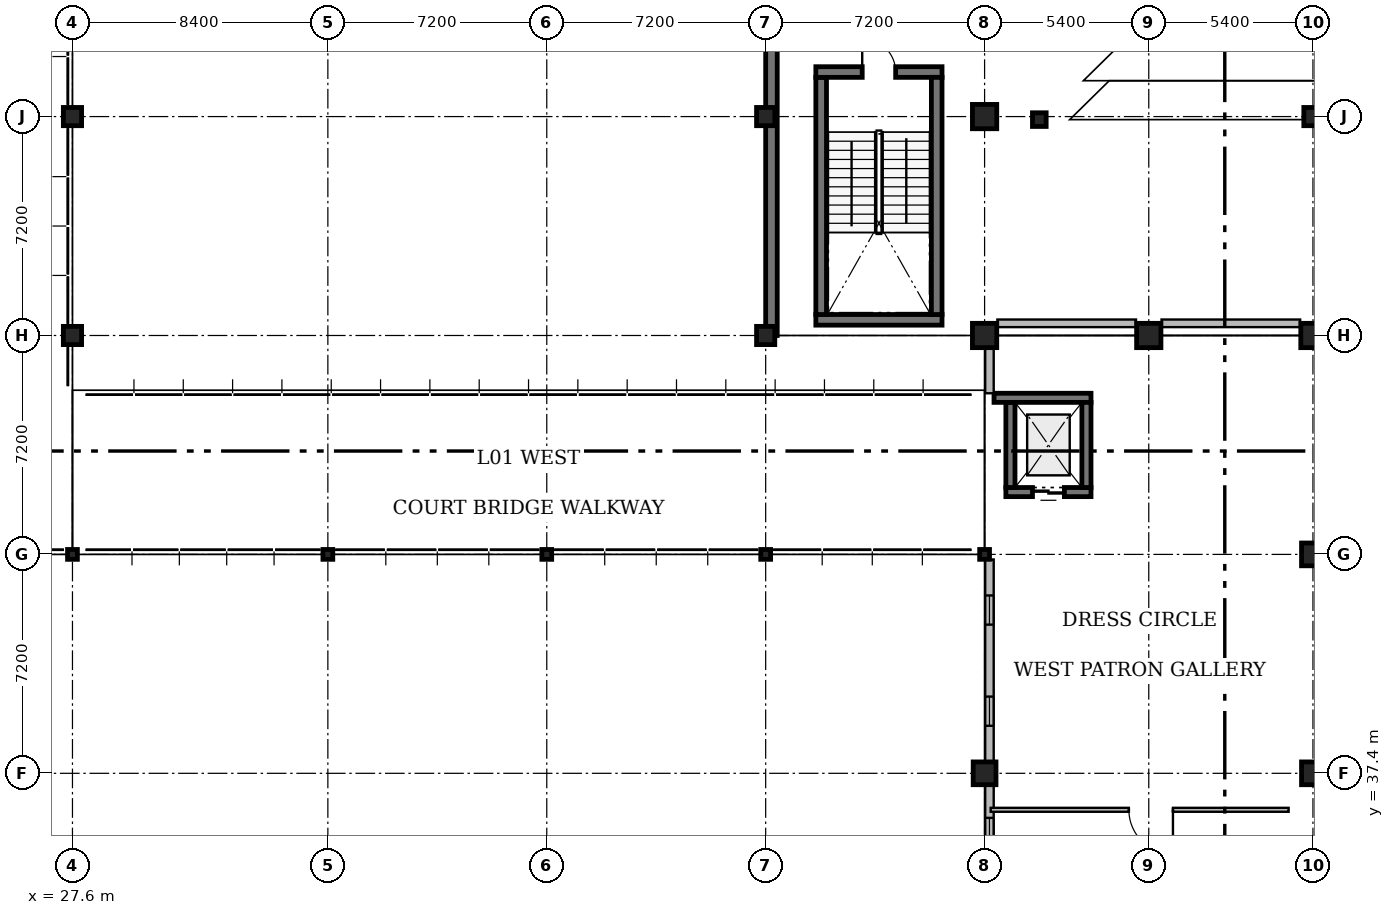
"""IFC4 building model, lengths in metres.
Left out: names, types, materials, properties, quantities, classifications, styles, units other than length and angle.
Written with IfcOpenShell. Run it as: python <this file> out.ifc"""

import sys

from ifc_helpers import new_model, si_unit, direction, frame, frame_2d, origin, origin_2d, place, context, subcontext, project, spatial, rectangle, circle, hollow_circle, extrude, element, fill, save


model = new_model("IFC4")
c1 = context("Model", 3, precision=1e-05, world=origin(), true_north=direction((0.0, 1.0)))
c2 = subcontext(c1, "Body", "Model", "MODEL_VIEW")
j1 = project(units=[si_unit("LENGTHUNIT", "METRE"), si_unit("PLANEANGLEUNIT", "RADIAN")], contexts=[c1])
p1 = place(None, origin())
s1 = spatial("IfcSite", under=j1, at=p1, CompositionType="ELEMENT")
p2 = place(p1, origin())
s2 = spatial("IfcBuilding", under=s1, at=p2, CompositionType="ELEMENT")
p3 = place(p2, frame((0.0, 0.0, 4.8)))
s3 = spatial("IfcBuildingStorey", under=s2, at=p3, CompositionType="ELEMENT", Elevation=4.8)
for number, where, z_axis, x_axis in (
    (1, (68.4, 37.4, 0.0), (0.0, 0.0, 1.0), (1.0, 0.0, 0.0)),
    (2, (68.4, 44.6, 0.0), (0.0, 0.0, 1.0), (1.0, 0.0, 0.0)),
):
    element("IfcColumn", number, at=place(p3, frame(where, z_axis=z_axis, x_axis=x_axis)), inside=s3, PredefinedType="COLUMN", context=c2, shape_type="SweptSolid", body=[
        extrude(circle(Radius=0.375, at=origin_2d()), origin(), (0.0, 0.0, 1.0), 4.2),
    ])
p4 = place(p3, frame((68.4, 51.8, 0.0), z_axis=(0.0, 0.0, 1.0), x_axis=(1.0, 0.0, 0.0)))
e3 = element("IfcColumn", 3, at=p4, inside=s3, PredefinedType="COLUMN", context=c2, shape_type="SweptSolid", body=[
    extrude(rectangle(XDim=0.8, YDim=0.8, at=origin_2d()), origin(), (0.0, 0.0, 1.0), 4.2),
])
p5 = place(p3, frame((68.4, 59.0, 0.0), z_axis=(0.0, 0.0, 1.0), x_axis=(1.0, 0.0, 0.0)))
e4 = element("IfcColumn", 4, at=p5, inside=s3, PredefinedType="COLUMN", context=c2, shape_type="SweptSolid", body=[
    extrude(rectangle(XDim=0.6, YDim=0.6, at=origin_2d()), origin(), (0.0, 0.0, 1.0), 4.2),
])
p6 = place(p3, frame((27.6, 44.6, 0.0), z_axis=(0.0, 0.0, 1.0), x_axis=(1.0, 0.0, 0.0)))
e5 = element("IfcColumn", 5, at=p6, inside=s3, PredefinedType="COLUMN", context=c2, shape_type="SweptSolid", body=[
    extrude(hollow_circle(Radius=0.162, WallThickness=0.012, at=origin_2d()), origin(), (0.0, 0.0, 1.0), 4.2),
])
for number, where, z_axis, x_axis in (
    (6, (27.6, 51.8, 0.0), (0.0, 0.0, 1.0), (1.0, 0.0, 0.0)),
    (7, (27.6, 59.0, 0.0), (0.0, 0.0, 1.0), (1.0, 0.0, 0.0)),
):
    element("IfcColumn", number, at=place(p3, frame(where, z_axis=z_axis, x_axis=x_axis)), inside=s3, PredefinedType="COLUMN", context=c2, shape_type="SweptSolid", body=[
        extrude(rectangle(XDim=0.6, YDim=0.6, at=origin_2d()), origin(), (0.0, 0.0, 1.0), 4.2),
    ])
for number, where, z_axis, x_axis in (
    (8, (36.0, 44.6, 0.0), (0.0, 0.0, 1.0), (1.0, 0.0, 0.0)),
    (9, (43.2, 44.6, 0.0), (0.0, 0.0, 1.0), (1.0, 0.0, 0.0)),
    (10, (50.4, 44.6, 0.0), (0.0, 0.0, 1.0), (1.0, 0.0, 0.0)),
):
    element("IfcColumn", number, at=place(p3, frame(where, z_axis=z_axis, x_axis=x_axis)), inside=s3, PredefinedType="COLUMN", context=c2, shape_type="SweptSolid", body=[
        extrude(hollow_circle(Radius=0.162, WallThickness=0.012, at=origin_2d()), origin(), (0.0, 0.0, 1.0), 4.2),
    ])
for number, where, z_axis, x_axis in (
    (11, (50.4, 51.8, 0.0), (0.0, 0.0, 1.0), (1.0, 0.0, 0.0)),
    (12, (50.4, 59.0, 0.0), (0.0, 0.0, 1.0), (1.0, 0.0, 0.0)),
):
    element("IfcColumn", number, at=place(p3, frame(where, z_axis=z_axis, x_axis=x_axis)), inside=s3, PredefinedType="COLUMN", context=c2, shape_type="SweptSolid", body=[
        extrude(rectangle(XDim=0.6, YDim=0.6, at=origin_2d()), origin(), (0.0, 0.0, 1.0), 4.2),
    ])
p7 = place(p3, frame((57.6, 37.4, 0.0), z_axis=(0.0, 0.0, 1.0), x_axis=(1.0, 0.0, 0.0)))
e13 = element("IfcColumn", 13, at=p7, inside=s3, PredefinedType="COLUMN", context=c2, shape_type="SweptSolid", body=[
    extrude(circle(Radius=0.375, at=origin_2d()), origin(), (0.0, 0.0, 1.0), 4.2),
])
p8 = place(p3, frame((57.6, 44.6, 0.0), z_axis=(0.0, 0.0, 1.0), x_axis=(1.0, 0.0, 0.0)))
e14 = element("IfcColumn", 14, at=p8, inside=s3, PredefinedType="COLUMN", context=c2, shape_type="SweptSolid", body=[
    extrude(hollow_circle(Radius=0.162, WallThickness=0.012, at=origin_2d()), origin(), (0.0, 0.0, 1.0), 4.2),
])
for number, where, z_axis, x_axis in (
    (15, (57.6, 51.8, 0.0), (0.0, 0.0, 1.0), (1.0, 0.0, 0.0)),
    (16, (57.6, 59.0, 0.0), (0.0, 0.0, 1.0), (1.0, 0.0, 0.0)),
    (17, (63.0, 51.8, 0.0), (0.0, 0.0, 1.0), (1.0, 0.0, 0.0)),
):
    element("IfcColumn", number, at=place(p3, frame(where, z_axis=z_axis, x_axis=x_axis)), inside=s3, PredefinedType="COLUMN", context=c2, shape_type="SweptSolid", body=[
        extrude(rectangle(XDim=0.8, YDim=0.8, at=origin_2d()), origin(), (0.0, 0.0, 1.0), 4.2),
    ])
p9 = place(p3, frame((59.4, 58.9, 0.0), z_axis=(0.0, 0.0, 1.0), x_axis=(1.0, 0.0, 0.0)))
e18 = element("IfcColumn", 18, at=p9, inside=s3, PredefinedType="COLUMN", context=c2, shape_type="SweptSolid", body=[
    extrude(rectangle(XDim=0.45, YDim=0.45, at=origin_2d()), origin(), (0.0, 0.0, 1.0), 4.2),
])
p10 = place(p3, frame((61.1, 46.65, 0.0), z_axis=(0.0, 0.0, 1.0), x_axis=(-1.0, 0.0, 0.0)))
e19 = element("IfcWall", 19, at=p10, inside=s3, PredefinedType="SOLIDWALL", context=c2, shape_type="SweptSolid", body=[
    extrude(rectangle(XDim=2.8, YDim=0.3, at=frame_2d((1.4, 0.0))), origin(), (0.0, 0.0, 1.0), 4.2),
])
p11 = place(p10, frame((0.875, 0.0, 0.0)))
e20 = element("IfcOpeningElement", 20, at=p11, cuts=e19, PredefinedType="OPENING", context=c2, shape_type="SweptSolid", body=[
    extrude(rectangle(XDim=1.05, YDim=2.1, at=frame_2d((0.525, 1.05))), frame((0.0, 0.17, 0.0), z_axis=(0.0, -1.0, 0.0), x_axis=(1.0, 0.0, 0.0)), (0.0, 0.0, 1.0), 0.34),
])
p12 = place(p3, frame((58.45, 46.8, 0.0), z_axis=(0.0, 0.0, 1.0), x_axis=(0.0, 1.0, 0.0)))
e21 = element("IfcWall", 21, at=p12, inside=s3, PredefinedType="SOLIDWALL", context=c2, shape_type="SweptSolid", body=[
    extrude(rectangle(XDim=2.8, YDim=0.3, at=frame_2d((1.4, 0.0))), origin(), (0.0, 0.0, 1.0), 4.2),
])
p13 = place(p3, frame((57.91, 49.75, 0.0), z_axis=(0.0, 0.0, 1.0), x_axis=(1.0, 0.0, 0.0)))
e22 = element("IfcWall", 22, at=p13, inside=s3, PredefinedType="SOLIDWALL", context=c2, shape_type="SweptSolid", body=[
    extrude(rectangle(XDim=3.19, YDim=0.3, at=frame_2d((1.595, 0.0))), origin(), (0.0, 0.0, 1.0), 4.2),
])
p14 = place(p3, frame((60.95, 49.6, 0.0), z_axis=(0.0, 0.0, 1.0), x_axis=(0.0, -1.0, 0.0)))
e23 = element("IfcWall", 23, at=p14, inside=s3, PredefinedType="SOLIDWALL", context=c2, shape_type="SweptSolid", body=[
    extrude(rectangle(XDim=2.8, YDim=0.3, at=frame_2d((1.4, 0.0))), origin(), (0.0, 0.0, 1.0), 4.2),
])
p15 = place(p3, frame((56.2, 52.315, 0.0), z_axis=(0.0, 0.0, 1.0), x_axis=(-1.0, 0.0, 0.0)))
e24 = element("IfcWall", 24, at=p15, inside=s3, PredefinedType="SOLIDWALL", context=c2, shape_type="SweptSolid", body=[
    extrude(rectangle(XDim=4.15, YDim=0.35, at=frame_2d((2.075, 0.0))), origin(), (0.0, 0.0, 1.0), 4.2),
])
p16 = place(p3, frame((52.225, 52.49, 0.0), z_axis=(0.0, 0.0, 1.0), x_axis=(0.0, 1.0, 0.0)))
e25 = element("IfcWall", 25, at=p16, inside=s3, PredefinedType="SOLIDWALL", context=c2, shape_type="SweptSolid", body=[
    extrude(rectangle(XDim=7.8, YDim=0.35, at=frame_2d((3.9, 0.0))), origin(), (0.0, 0.0, 1.0), 4.2),
])
p17 = place(p3, frame((52.05, 60.465, 0.0), z_axis=(0.0, 0.0, 1.0), x_axis=(1.0, 0.0, 0.0)))
e26 = element("IfcWall", 26, at=p17, inside=s3, PredefinedType="SOLIDWALL", context=c2, shape_type="SweptSolid", body=[
    extrude(rectangle(XDim=4.15, YDim=0.35, at=frame_2d((2.075, 0.0))), origin(), (0.0, 0.0, 1.0), 4.2),
])
p18 = place(p17, frame((1.525, 0.0, 0.0)))
e27 = element("IfcOpeningElement", 27, at=p18, cuts=e26, PredefinedType="OPENING", context=c2, shape_type="SweptSolid", body=[
    extrude(rectangle(XDim=1.1, YDim=2.15, at=frame_2d((0.55, 1.075))), frame((0.0, 0.195, 0.0), z_axis=(0.0, -1.0, 0.0), x_axis=(1.0, 0.0, 0.0)), (0.0, 0.0, 1.0), 0.39),
])
p19 = place(p3, frame((56.025, 60.29, 0.0), z_axis=(0.0, 0.0, 1.0), x_axis=(0.0, -1.0, 0.0)))
e28 = element("IfcWall", 28, at=p19, inside=s3, PredefinedType="SOLIDWALL", context=c2, shape_type="SweptSolid", body=[
    extrude(rectangle(XDim=7.8, YDim=0.35, at=frame_2d((3.9, 0.0))), origin(), (0.0, 0.0, 1.0), 4.2),
])
p20 = place(p3, frame((57.76, 30.58, 0.0), z_axis=(0.0, 0.0, 1.0), x_axis=(0.0, 1.0, 0.0)))
e29 = element("IfcWall", 29, at=p20, inside=s3, PredefinedType="SOLIDWALL", context=c2, shape_type="SweptSolid", body=[
    extrude(rectangle(XDim=6.44, YDim=0.28, at=frame_2d((3.22, 0.0))), origin(), (0.0, 0.0, 1.0), 3.653),
])
p21 = place(p20, frame((1.085, 0.0, 0.95)))
e30 = element("IfcOpeningElement", 30, at=p21, cuts=e29, PredefinedType="OPENING", context=c2, shape_type="SweptSolid", body=[
    extrude(rectangle(XDim=1.05, YDim=1.6, at=frame_2d((0.525, 0.8))), frame((0.0, 0.16, 0.0), z_axis=(0.0, -1.0, 0.0), x_axis=(1.0, 0.0, 0.0)), (0.0, 0.0, 1.0), 0.32),
])
p22 = place(p20, frame((4.305, 0.0, 0.95)))
e31 = element("IfcOpeningElement", 31, at=p22, cuts=e29, PredefinedType="OPENING", context=c2, shape_type="SweptSolid", body=[
    extrude(rectangle(XDim=1.05, YDim=1.6, at=frame_2d((0.525, 0.8))), frame((0.0, 0.16, 0.0), z_axis=(0.0, -1.0, 0.0), x_axis=(1.0, 0.0, 0.0)), (0.0, 0.0, 1.0), 0.32),
])
p23 = place(p3, frame((57.76, 37.78, 0.0), z_axis=(0.0, 0.0, 1.0), x_axis=(0.0, 1.0, 0.0)))
e32 = element("IfcWall", 32, at=p23, inside=s3, PredefinedType="SOLIDWALL", context=c2, shape_type="SweptSolid", body=[
    extrude(rectangle(XDim=6.653, YDim=0.28, at=frame_2d((3.327, 0.0))), origin(), (0.0, 0.0, 1.0), 3.653),
])
p24 = place(p23, frame((1.183, 0.0, 0.95)))
e33 = element("IfcOpeningElement", 33, at=p24, cuts=e32, PredefinedType="OPENING", context=c2, shape_type="SweptSolid", body=[
    extrude(rectangle(XDim=0.96, YDim=1.8, at=frame_2d((0.48, 0.9))), frame((0.0, 0.16, 0.0), z_axis=(0.0, -1.0, 0.0), x_axis=(1.0, 0.0, 0.0)), (0.0, 0.0, 1.0), 0.32),
])
p25 = place(p23, frame((4.51, 0.0, 0.95)))
e34 = element("IfcOpeningElement", 34, at=p25, cuts=e32, PredefinedType="OPENING", context=c2, shape_type="SweptSolid", body=[
    extrude(rectangle(XDim=0.96, YDim=1.8, at=frame_2d((0.48, 0.9))), frame((0.0, 0.16, 0.0), z_axis=(0.0, -1.0, 0.0), x_axis=(1.0, 0.0, 0.0)), (0.0, 0.0, 1.0), 0.32),
])
p26 = place(p3, frame((57.76, 49.9, 0.0), z_axis=(0.0, 0.0, 1.0), x_axis=(0.0, 1.0, 0.0)))
e35 = element("IfcWall", 35, at=p26, inside=s3, PredefinedType="SOLIDWALL", context=c2, shape_type="SweptSolid", body=[
    extrude(rectangle(XDim=1.95, YDim=0.28, at=frame_2d((0.975, 0.0))), origin(), (0.0, 0.0, 1.0), 2.723),
])
p27 = place(p3, frame((50.59, 51.8, 0.0), z_axis=(0.0, 0.0, 1.0), x_axis=(0.0, 1.0, 0.0)))
e36 = element("IfcWall", 36, at=p27, inside=s3, PredefinedType="SOLIDWALL", context=c2, shape_type="SweptSolid", body=[
    extrude(rectangle(XDim=36.0, YDim=0.38, at=frame_2d((18.0, 0.0))), origin(), (0.0, 0.0, 1.0), 3.94),
])
for number, where, z_axis, x_axis in (
    (37, (67.98, 52.2, 0.0), (0.0, 0.0, 1.0), (-1.0, 0.0, 0.0)),
    (38, (62.58, 52.2, 0.0), (0.0, 0.0, 1.0), (-1.0, 0.0, 0.0)),
):
    element("IfcWall", number, at=place(p3, frame(where, z_axis=z_axis, x_axis=x_axis)), inside=s3, PredefinedType="PARTITIONING", context=c2, shape_type="SweptSolid", body=[
        extrude(rectangle(XDim=4.56, YDim=0.25, at=frame_2d((2.28, 0.0))), origin(), (0.0, 0.0, 1.0), 3.26),
    ])
p28 = place(p3, frame((67.6, 36.2, 0.0), z_axis=(0.0, 0.0, 1.0), x_axis=(-1.0, 0.0, 0.0)))
e39 = element("IfcWall", 39, at=p28, inside=s3, PredefinedType="PARTITIONING", context=c2, shape_type="SweptSolid", body=[
    extrude(rectangle(XDim=9.8, YDim=0.13, at=frame_2d((4.9, 0.0))), origin(), (0.0, 0.0, 1.0), 3.94),
])
p29 = place(p28, frame((3.805, 0.0, 0.0)))
e40 = element("IfcOpeningElement", 40, at=p29, cuts=e39, PredefinedType="OPENING", context=c2, shape_type="SweptSolid", body=[
    extrude(rectangle(XDim=1.45, YDim=2.2, at=frame_2d((0.725, 1.1))), frame((0.0, 0.085, 0.0), z_axis=(0.0, -1.0, 0.0), x_axis=(1.0, 0.0, 0.0)), (0.0, 0.0, 1.0), 0.17),
])
p30 = place(p11, origin())
e41 = element("IfcDoor", 41, at=p30, inside=s3, OperationType="DOUBLE_DOOR_SLIDING", PredefinedType="DOOR", context=c2, shape_type="SweptSolid", body=[
    extrude(rectangle(XDim=1.05, YDim=2.1, at=frame_2d((0.525, 1.05))), frame((0.0, 0.025, 0.0), z_axis=(0.0, -1.0, 0.0), x_axis=(1.0, 0.0, 0.0)), (0.0, 0.0, 1.0), 0.05),
])
fill(e20, e41)
p31 = place(p18, origin())
e42 = element("IfcDoor", 42, at=p31, inside=s3, OperationType="SINGLE_SWING_LEFT", PredefinedType="DOOR", context=c2, shape_type="SweptSolid", body=[
    extrude(rectangle(XDim=1.1, YDim=2.15, at=frame_2d((0.55, 1.075))), frame((0.0, 0.025, 0.0), z_axis=(0.0, -1.0, 0.0), x_axis=(1.0, 0.0, 0.0)), (0.0, 0.0, 1.0), 0.05),
])
fill(e27, e42)
p32 = place(p22, origin())
e43 = element("IfcWindow", 43, at=p32, inside=s3, PartitioningType="SINGLE_PANEL", PredefinedType="WINDOW", context=c2, shape_type="SweptSolid", body=[
    extrude(rectangle(XDim=1.05, YDim=1.6, at=frame_2d((0.525, 0.8))), frame((0.0, 0.03, 0.0), z_axis=(0.0, -1.0, 0.0), x_axis=(1.0, 0.0, 0.0)), (0.0, 0.0, 1.0), 0.06),
])
fill(e31, e43)
p33 = place(p24, origin())
e44 = element("IfcWindow", 44, at=p33, inside=s3, PartitioningType="SINGLE_PANEL", PredefinedType="WINDOW", context=c2, shape_type="SweptSolid", body=[
    extrude(rectangle(XDim=0.96, YDim=1.8, at=frame_2d((0.48, 0.9))), frame((0.0, 0.03, 0.0), z_axis=(0.0, -1.0, 0.0), x_axis=(1.0, 0.0, 0.0)), (0.0, 0.0, 1.0), 0.06),
])
fill(e33, e44)
p34 = place(p25, origin())
e45 = element("IfcWindow", 45, at=p34, inside=s3, PartitioningType="SINGLE_PANEL", PredefinedType="WINDOW", context=c2, shape_type="SweptSolid", body=[
    extrude(rectangle(XDim=0.96, YDim=1.8, at=frame_2d((0.48, 0.9))), frame((0.0, 0.03, 0.0), z_axis=(0.0, -1.0, 0.0), x_axis=(1.0, 0.0, 0.0)), (0.0, 0.0, 1.0), 0.06),
])
fill(e34, e45)
p35 = place(p29, origin())
e46 = element("IfcDoor", 46, at=p35, inside=s3, OperationType="DOUBLE_DOOR_SINGLE_SWING", PredefinedType="DOOR", context=c2, shape_type="SweptSolid", body=[
    extrude(rectangle(XDim=1.45, YDim=2.2, at=frame_2d((0.725, 1.1))), frame((0.0, 0.025, 0.0), z_axis=(0.0, -1.0, 0.0), x_axis=(1.0, 0.0, 0.0)), (0.0, 0.0, 1.0), 0.05),
])
fill(e40, e46)
save(model, sys.argv[1])
